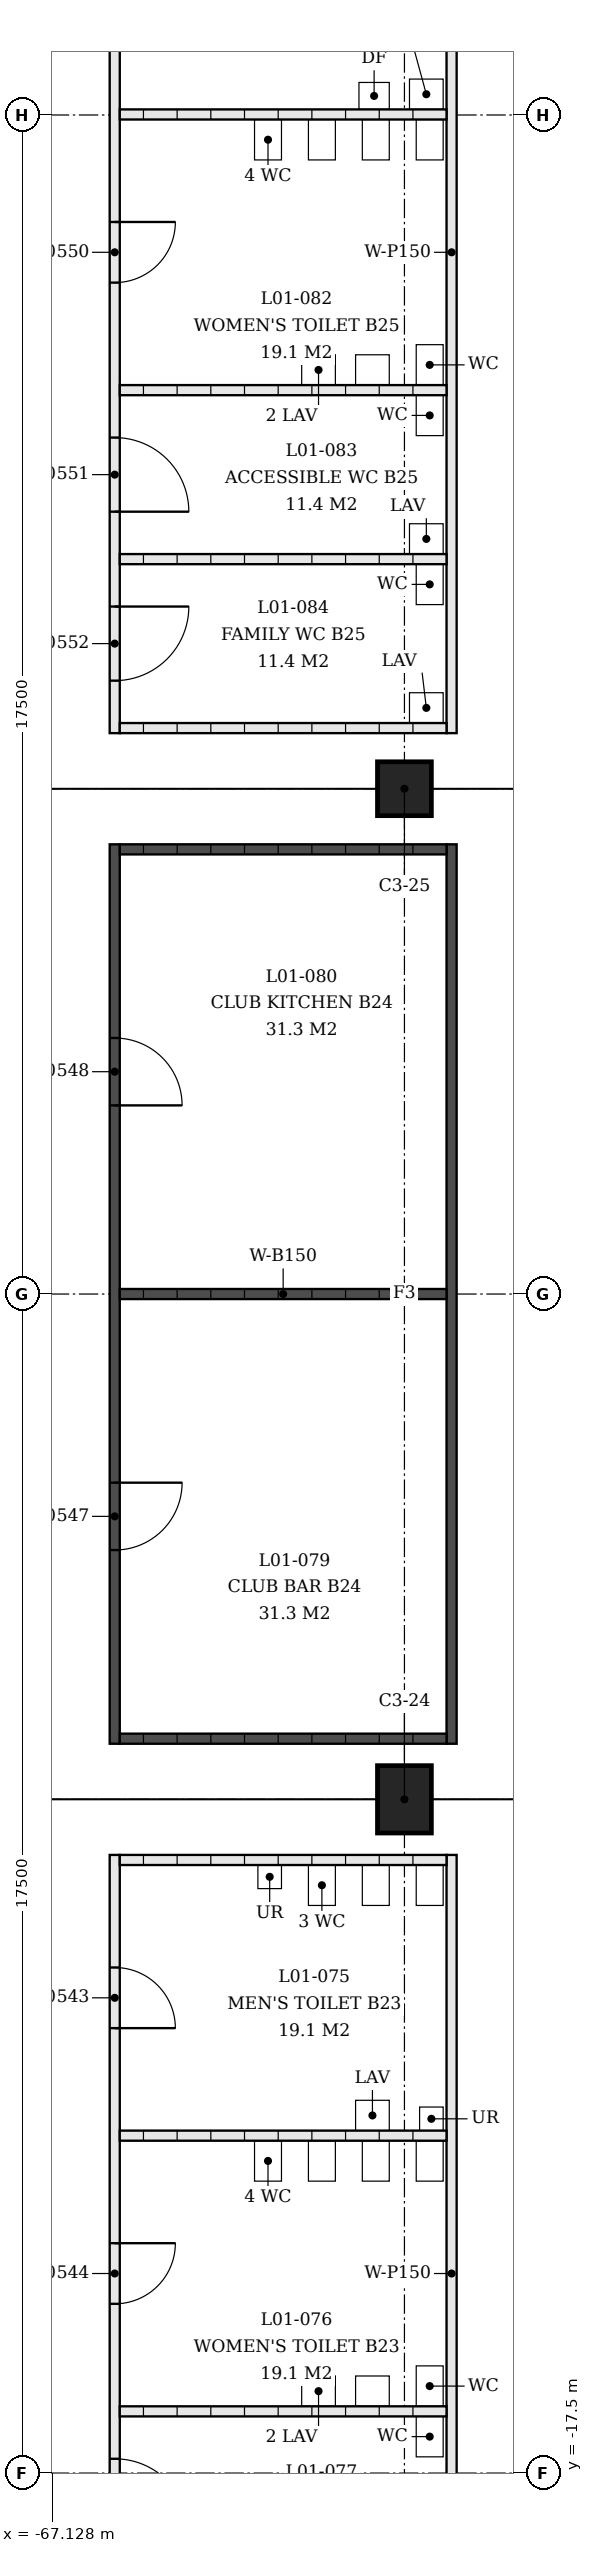
"""IFC4 building model, lengths in metres.
Left out: names, types, materials, properties, quantities, classifications, styles, units other than length and angle.
Written with IfcOpenShell. Run it as: python <this file> out.ifc"""

import sys

from ifc_helpers import new_model, si_unit, direction, frame, frame_2d, origin, origin_2d, place, context, subcontext, project, spatial, rectangle, extrude, element, fill, save


model = new_model("IFC4")
c1 = context("Model", 3, precision=1e-05, world=origin(), true_north=direction((0.0, 1.0)))
c2 = subcontext(c1, "Body", "Model", "MODEL_VIEW")
j1 = project(units=[si_unit("LENGTHUNIT", "METRE"), si_unit("PLANEANGLEUNIT", "RADIAN")], contexts=[c1])
p1 = place(None, origin())
s1 = spatial("IfcSite", under=j1, at=p1, CompositionType="ELEMENT")
p2 = place(p1, origin())
s2 = spatial("IfcBuilding", under=s1, at=p2, CompositionType="ELEMENT")
p3 = place(p2, frame((0.0, 0.0, 4.5)))
s3 = spatial("IfcBuildingStorey", under=s2, at=p3, CompositionType="ELEMENT", Elevation=4.5)
p4 = place(p3, frame((-61.9, -7.5, 0.0), z_axis=(0.0, 0.0, 1.0), x_axis=(0.0, -1.0, 0.0)))
e1 = element("IfcColumn", 1, at=p4, inside=s3, PredefinedType="COLUMN", context=c2, shape_type="SweptSolid", body=[
    extrude(rectangle(XDim=1.0, YDim=0.8, at=origin_2d()), origin(), (0.0, 0.0, 1.0), 4.5),
])
p5 = place(p3, frame((-61.9, 7.5, 0.0), z_axis=(0.0, 0.0, 1.0), x_axis=(0.0, -1.0, 0.0)))
e2 = element("IfcColumn", 2, at=p5, inside=s3, PredefinedType="COLUMN", context=c2, shape_type="SweptSolid", body=[
    extrude(rectangle(XDim=0.8, YDim=0.8, at=origin_2d()), origin(), (0.0, 0.0, 1.0), 4.5),
])
p6 = place(p3, frame((-61.2, -8.325, 0.0), z_axis=(0.0, 0.0, 1.0), x_axis=(0.0, -1.0, 0.0)))
e3 = element("IfcWall", 3, at=p6, inside=s3, PredefinedType="PARTITIONING", context=c2, shape_type="SweptSolid", body=[
    extrude(rectangle(XDim=13.35, YDim=0.15, at=frame_2d((6.675, 0.0))), origin(), (0.0, 0.0, 1.0), 3.0),
])
p7 = place(p3, frame((-66.2, -8.325, 0.0), z_axis=(0.0, 0.0, 1.0), x_axis=(0.0, -1.0, 0.0)))
e4 = element("IfcWall", 4, at=p7, inside=s3, PredefinedType="PARTITIONING", context=c2, shape_type="SweptSolid", body=[
    extrude(rectangle(XDim=13.35, YDim=0.15, at=frame_2d((6.675, 0.0))), origin(), (0.0, 0.0, 1.0), 3.0),
])
p8 = place(p7, frame((1.671, 0.0, 0.0)))
e5 = element("IfcOpeningElement", 5, at=p8, cuts=e4, PredefinedType="OPENING", context=c2, shape_type="SweptSolid", body=[
    extrude(rectangle(XDim=0.9, YDim=2.1, at=frame_2d((0.45, 1.05))), frame((0.0, 0.075, 0.0), z_axis=(0.0, -1.0, 0.0), x_axis=(1.0, 0.0, 0.0)), (0.0, 0.0, 1.0), 0.15),
])
p9 = place(p7, frame((5.763, 0.0, 0.0)))
e6 = element("IfcOpeningElement", 6, at=p9, cuts=e4, PredefinedType="OPENING", context=c2, shape_type="SweptSolid", body=[
    extrude(rectangle(XDim=0.9, YDim=2.1, at=frame_2d((0.45, 1.05))), frame((0.0, 0.075, 0.0), z_axis=(0.0, -1.0, 0.0), x_axis=(1.0, 0.0, 0.0)), (0.0, 0.0, 1.0), 0.15),
])
p10 = place(p7, frame((8.963, 0.0, 0.0)))
e7 = element("IfcOpeningElement", 7, at=p10, cuts=e4, PredefinedType="OPENING", context=c2, shape_type="SweptSolid", body=[
    extrude(rectangle(XDim=1.1, YDim=2.1, at=frame_2d((0.55, 1.05))), frame((0.0, 0.075, 0.0), z_axis=(0.0, -1.0, 0.0), x_axis=(1.0, 0.0, 0.0)), (0.0, 0.0, 1.0), 0.15),
])
p11 = place(p7, frame((11.471, 0.0, 0.0)))
e8 = element("IfcOpeningElement", 8, at=p11, cuts=e4, PredefinedType="OPENING", context=c2, shape_type="SweptSolid", body=[
    extrude(rectangle(XDim=1.1, YDim=2.1, at=frame_2d((0.55, 1.05))), frame((0.0, 0.075, 0.0), z_axis=(0.0, -1.0, 0.0), x_axis=(1.0, 0.0, 0.0)), (0.0, 0.0, 1.0), 0.15),
])
for number, where, z_axis, x_axis in (
    (9, (-61.275, -8.4, 0.0), (0.0, 0.0, 1.0), (-1.0, 0.0, 0.0)),
    (10, (-61.275, -12.492, 0.0), (0.0, 0.0, 1.0), (-1.0, 0.0, 0.0)),
    (11, (-61.275, -16.584, 0.0), (0.0, 0.0, 1.0), (-1.0, 0.0, 0.0)),
):
    element("IfcWall", number, at=place(p3, frame(where, z_axis=z_axis, x_axis=x_axis)), inside=s3, PredefinedType="PARTITIONING", context=c2, shape_type="SweptSolid", body=[
        extrude(rectangle(XDim=4.85, YDim=0.15, at=frame_2d((2.425, 0.0))), origin(), (0.0, 0.0, 1.0), 3.0),
    ])
p12 = place(p3, frame((-61.2, -6.675, 0.0), z_axis=(0.0, 0.0, 1.0), x_axis=(0.0, 1.0, 0.0)))
e12 = element("IfcWall", 12, at=p12, inside=s3, PredefinedType="SOLIDWALL", context=c2, shape_type="SweptSolid", body=[
    extrude(rectangle(XDim=13.35, YDim=0.15, at=frame_2d((6.675, 0.0))), origin(), (0.0, 0.0, 1.0), 3.0),
])
p13 = place(p3, frame((-66.2, -6.675, 0.0), z_axis=(0.0, 0.0, 1.0), x_axis=(0.0, 1.0, 0.0)))
e13 = element("IfcWall", 13, at=p13, inside=s3, PredefinedType="SOLIDWALL", context=c2, shape_type="SweptSolid", body=[
    extrude(rectangle(XDim=13.35, YDim=0.15, at=frame_2d((6.675, 0.0))), origin(), (0.0, 0.0, 1.0), 3.0),
])
p14 = place(p13, frame((2.875, 0.0, 0.0)))
e14 = element("IfcOpeningElement", 14, at=p14, cuts=e13, PredefinedType="OPENING", context=c2, shape_type="SweptSolid", body=[
    extrude(rectangle(XDim=1.0, YDim=2.1, at=frame_2d((0.5, 1.05))), frame((0.0, 0.075, 0.0), z_axis=(0.0, -1.0, 0.0), x_axis=(1.0, 0.0, 0.0)), (0.0, 0.0, 1.0), 0.15),
])
p15 = place(p13, frame((9.475, 0.0, 0.0)))
e15 = element("IfcOpeningElement", 15, at=p15, cuts=e13, PredefinedType="OPENING", context=c2, shape_type="SweptSolid", body=[
    extrude(rectangle(XDim=1.0, YDim=2.1, at=frame_2d((0.5, 1.05))), frame((0.0, 0.075, 0.0), z_axis=(0.0, -1.0, 0.0), x_axis=(1.0, 0.0, 0.0)), (0.0, 0.0, 1.0), 0.15),
])
for number, where, z_axis, x_axis in (
    (16, (-61.275, -6.6, 0.0), (0.0, 0.0, 1.0), (-1.0, 0.0, 0.0)),
    (17, (-61.275, 0.0, 0.0), (0.0, 0.0, 1.0), (-1.0, 0.0, 0.0)),
    (18, (-61.275, 6.6, 0.0), (0.0, 0.0, 1.0), (-1.0, 0.0, 0.0)),
):
    element("IfcWall", number, at=place(p3, frame(where, z_axis=z_axis, x_axis=x_axis)), inside=s3, PredefinedType="SOLIDWALL", context=c2, shape_type="SweptSolid", body=[
        extrude(rectangle(XDim=4.85, YDim=0.15, at=frame_2d((2.425, 0.0))), origin(), (0.0, 0.0, 1.0), 3.0),
    ])
p16 = place(p3, frame((-61.2, 21.675, 0.0), z_axis=(0.0, 0.0, 1.0), x_axis=(0.0, -1.0, 0.0)))
e19 = element("IfcWall", 19, at=p16, inside=s3, PredefinedType="PARTITIONING", context=c2, shape_type="SweptSolid", body=[
    extrude(rectangle(XDim=13.35, YDim=0.15, at=frame_2d((6.675, 0.0))), origin(), (0.0, 0.0, 1.0), 3.0),
])
p17 = place(p3, frame((-66.2, 21.675, 0.0), z_axis=(0.0, 0.0, 1.0), x_axis=(0.0, -1.0, 0.0)))
e20 = element("IfcWall", 20, at=p17, inside=s3, PredefinedType="PARTITIONING", context=c2, shape_type="SweptSolid", body=[
    extrude(rectangle(XDim=13.35, YDim=0.15, at=frame_2d((6.675, 0.0))), origin(), (0.0, 0.0, 1.0), 3.0),
])
p18 = place(p17, frame((1.671, 0.0, 0.0)))
e21 = element("IfcOpeningElement", 21, at=p18, cuts=e20, PredefinedType="OPENING", context=c2, shape_type="SweptSolid", body=[
    extrude(rectangle(XDim=0.9, YDim=2.1, at=frame_2d((0.45, 1.05))), frame((0.0, 0.075, 0.0), z_axis=(0.0, -1.0, 0.0), x_axis=(1.0, 0.0, 0.0)), (0.0, 0.0, 1.0), 0.15),
])
p19 = place(p17, frame((5.763, 0.0, 0.0)))
e22 = element("IfcOpeningElement", 22, at=p19, cuts=e20, PredefinedType="OPENING", context=c2, shape_type="SweptSolid", body=[
    extrude(rectangle(XDim=0.9, YDim=2.1, at=frame_2d((0.45, 1.05))), frame((0.0, 0.075, 0.0), z_axis=(0.0, -1.0, 0.0), x_axis=(1.0, 0.0, 0.0)), (0.0, 0.0, 1.0), 0.15),
])
p20 = place(p17, frame((8.963, 0.0, 0.0)))
e23 = element("IfcOpeningElement", 23, at=p20, cuts=e20, PredefinedType="OPENING", context=c2, shape_type="SweptSolid", body=[
    extrude(rectangle(XDim=1.1, YDim=2.1, at=frame_2d((0.55, 1.05))), frame((0.0, 0.075, 0.0), z_axis=(0.0, -1.0, 0.0), x_axis=(1.0, 0.0, 0.0)), (0.0, 0.0, 1.0), 0.15),
])
p21 = place(p17, frame((11.471, 0.0, 0.0)))
e24 = element("IfcOpeningElement", 24, at=p21, cuts=e20, PredefinedType="OPENING", context=c2, shape_type="SweptSolid", body=[
    extrude(rectangle(XDim=1.1, YDim=2.1, at=frame_2d((0.55, 1.05))), frame((0.0, 0.075, 0.0), z_axis=(0.0, -1.0, 0.0), x_axis=(1.0, 0.0, 0.0)), (0.0, 0.0, 1.0), 0.15),
])
for number, where, z_axis, x_axis in (
    (25, (-61.275, 17.508, 0.0), (0.0, 0.0, 1.0), (-1.0, 0.0, 0.0)),
    (26, (-61.275, 13.416, 0.0), (0.0, 0.0, 1.0), (-1.0, 0.0, 0.0)),
    (27, (-61.275, 10.908, 0.0), (0.0, 0.0, 1.0), (-1.0, 0.0, 0.0)),
    (28, (-61.275, 8.4, 0.0), (0.0, 0.0, 1.0), (-1.0, 0.0, 0.0)),
):
    element("IfcWall", number, at=place(p3, frame(where, z_axis=z_axis, x_axis=x_axis)), inside=s3, PredefinedType="PARTITIONING", context=c2, shape_type="SweptSolid", body=[
        extrude(rectangle(XDim=4.85, YDim=0.15, at=frame_2d((2.425, 0.0))), origin(), (0.0, 0.0, 1.0), 3.0),
    ])
p22 = place(p8, origin())
e29 = element("IfcDoor", 29, at=p22, inside=s3, OperationType="SINGLE_SWING_LEFT", PredefinedType="DOOR", context=c2, shape_type="SweptSolid", body=[
    extrude(rectangle(XDim=0.9, YDim=2.1, at=frame_2d((0.45, 1.05))), frame((0.0, 0.025, 0.0), z_axis=(0.0, -1.0, 0.0), x_axis=(1.0, 0.0, 0.0)), (0.0, 0.0, 1.0), 0.05),
])
fill(e5, e29)
p23 = place(p9, origin())
e30 = element("IfcDoor", 30, at=p23, inside=s3, OperationType="SINGLE_SWING_RIGHT", PredefinedType="DOOR", context=c2, shape_type="SweptSolid", body=[
    extrude(rectangle(XDim=0.9, YDim=2.1, at=frame_2d((0.45, 1.05))), frame((0.0, 0.025, 0.0), z_axis=(0.0, -1.0, 0.0), x_axis=(1.0, 0.0, 0.0)), (0.0, 0.0, 1.0), 0.05),
])
fill(e6, e30)
p24 = place(p10, origin())
e31 = element("IfcDoor", 31, at=p24, inside=s3, OperationType="SINGLE_SWING_LEFT", PredefinedType="DOOR", context=c2, shape_type="SweptSolid", body=[
    extrude(rectangle(XDim=1.1, YDim=2.1, at=frame_2d((0.55, 1.05))), frame((0.0, 0.025, 0.0), z_axis=(0.0, -1.0, 0.0), x_axis=(1.0, 0.0, 0.0)), (0.0, 0.0, 1.0), 0.05),
])
fill(e7, e31)
p25 = place(p14, origin())
e32 = element("IfcDoor", 32, at=p25, inside=s3, OperationType="SINGLE_SWING_RIGHT", PredefinedType="DOOR", context=c2, shape_type="SweptSolid", body=[
    extrude(rectangle(XDim=1.0, YDim=2.1, at=frame_2d((0.5, 1.05))), frame((0.0, 0.025, 0.0), z_axis=(0.0, -1.0, 0.0), x_axis=(1.0, 0.0, 0.0)), (0.0, 0.0, 1.0), 0.05),
])
fill(e14, e32)
p26 = place(p15, origin())
e33 = element("IfcDoor", 33, at=p26, inside=s3, OperationType="SINGLE_SWING_LEFT", PredefinedType="DOOR", context=c2, shape_type="SweptSolid", body=[
    extrude(rectangle(XDim=1.0, YDim=2.1, at=frame_2d((0.5, 1.05))), frame((0.0, 0.025, 0.0), z_axis=(0.0, -1.0, 0.0), x_axis=(1.0, 0.0, 0.0)), (0.0, 0.0, 1.0), 0.05),
])
fill(e15, e33)
p27 = place(p19, origin())
e34 = element("IfcDoor", 34, at=p27, inside=s3, OperationType="SINGLE_SWING_RIGHT", PredefinedType="DOOR", context=c2, shape_type="SweptSolid", body=[
    extrude(rectangle(XDim=0.9, YDim=2.1, at=frame_2d((0.45, 1.05))), frame((0.0, 0.025, 0.0), z_axis=(0.0, -1.0, 0.0), x_axis=(1.0, 0.0, 0.0)), (0.0, 0.0, 1.0), 0.05),
])
fill(e22, e34)
p28 = place(p20, origin())
e35 = element("IfcDoor", 35, at=p28, inside=s3, OperationType="SINGLE_SWING_LEFT", PredefinedType="DOOR", context=c2, shape_type="SweptSolid", body=[
    extrude(rectangle(XDim=1.1, YDim=2.1, at=frame_2d((0.55, 1.05))), frame((0.0, 0.025, 0.0), z_axis=(0.0, -1.0, 0.0), x_axis=(1.0, 0.0, 0.0)), (0.0, 0.0, 1.0), 0.05),
])
fill(e23, e35)
p29 = place(p21, origin())
e36 = element("IfcDoor", 36, at=p29, inside=s3, OperationType="SINGLE_SWING_RIGHT", PredefinedType="DOOR", context=c2, shape_type="SweptSolid", body=[
    extrude(rectangle(XDim=1.1, YDim=2.1, at=frame_2d((0.55, 1.05))), frame((0.0, 0.025, 0.0), z_axis=(0.0, -1.0, 0.0), x_axis=(1.0, 0.0, 0.0)), (0.0, 0.0, 1.0), 0.05),
])
fill(e24, e36)
save(model, sys.argv[1])
